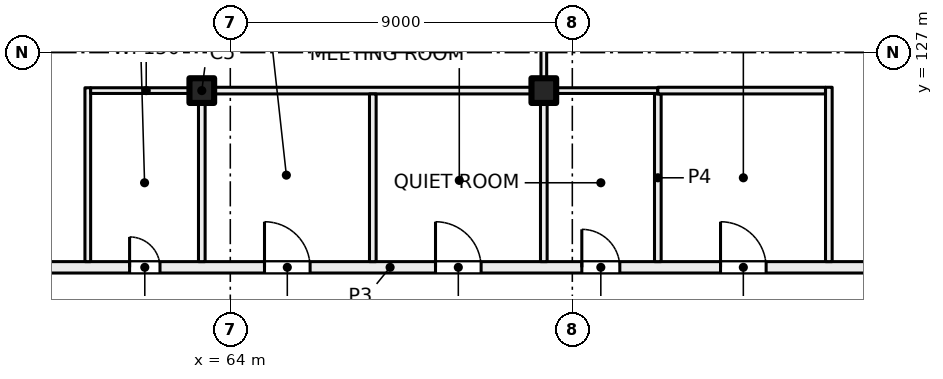
"""IFC4 building model, lengths in metres.
Left out: names, types, materials, properties, quantities, classifications, styles, units other than length and angle.
Written with IfcOpenShell. Run it as: python <this file> out.ifc"""

import sys

from ifc_helpers import new_model, si_unit, direction, frame, frame_2d, origin, origin_2d, place, context, subcontext, project, spatial, rectangle, extrude, element, fill, save


model = new_model("IFC4")
c1 = context("Model", 3, precision=1e-05, world=origin(), true_north=direction((0.0, 1.0)))
c2 = subcontext(c1, "Body", "Model", "MODEL_VIEW")
j1 = project(units=[si_unit("LENGTHUNIT", "METRE"), si_unit("PLANEANGLEUNIT", "RADIAN")], contexts=[c1])
p1 = place(None, origin())
s1 = spatial("IfcSite", under=j1, at=p1, CompositionType="ELEMENT")
p2 = place(p1, origin())
s2 = spatial("IfcBuilding", under=s1, at=p2, CompositionType="ELEMENT")
p3 = place(p2, frame((0.0, 0.0, 178.5)))
s3 = spatial("IfcBuildingStorey", under=s2, at=p3, CompositionType="ELEMENT", Elevation=178.5)
for number, where, z_axis, x_axis in (
    (1, (63.25, 126.0, 0.0), (0.0, 0.0, 1.0), (1.0, 0.0, 0.0)),
    (2, (72.25, 126.0, 0.0), (0.0, 0.0, 1.0), (1.0, 0.0, 0.0)),
):
    element("IfcColumn", number, at=place(p3, frame(where, z_axis=z_axis, x_axis=x_axis)), inside=s3, PredefinedType="COLUMN", context=c2, shape_type="SweptSolid", body=[
        extrude(rectangle(XDim=0.65, YDim=0.65, at=origin_2d()), origin(), (0.0, 0.0, 1.0), 4.0),
    ])
p4 = place(p3, frame((50.657, 121.35, 0.0), z_axis=(0.0, 0.0, 1.0), x_axis=(1.0, 0.0, 0.0)))
e3 = element("IfcWall", 3, at=p4, inside=s3, PredefinedType="PARTITIONING", context=c2, shape_type="SweptSolid", body=[
    extrude(rectangle(XDim=35.096, YDim=0.3, at=frame_2d((17.548, 0.0))), origin(), (0.0, 0.0, 1.0), 3.625),
])
p5 = place(p4, frame((26.243, 0.0, 0.0)))
e4 = element("IfcOpeningElement", 4, at=p5, cuts=e3, PredefinedType="OPENING", context=c2, shape_type="SweptSolid", body=[
    extrude(rectangle(XDim=1.2, YDim=2.1, at=frame_2d((0.6, 1.05))), frame((0.0, 0.16, 0.0), z_axis=(0.0, -1.0, 0.0), x_axis=(1.0, 0.0, 0.0)), (0.0, 0.0, 1.0), 0.32),
])
p6 = place(p4, frame((22.593, 0.0, 0.0)))
e5 = element("IfcOpeningElement", 5, at=p6, cuts=e3, PredefinedType="OPENING", context=c2, shape_type="SweptSolid", body=[
    extrude(rectangle(XDim=1.0, YDim=2.1, at=frame_2d((0.5, 1.05))), frame((0.0, 0.16, 0.0), z_axis=(0.0, -1.0, 0.0), x_axis=(1.0, 0.0, 0.0)), (0.0, 0.0, 1.0), 0.32),
])
p7 = place(p4, frame((31.193, 0.0, 0.0)))
e6 = element("IfcOpeningElement", 6, at=p7, cuts=e3, PredefinedType="OPENING", context=c2, shape_type="SweptSolid", body=[
    extrude(rectangle(XDim=1.8, YDim=2.1, at=frame_2d((0.9, 1.05))), frame((0.0, 0.16, 0.0), z_axis=(0.0, -1.0, 0.0), x_axis=(1.0, 0.0, 0.0)), (0.0, 0.0, 1.0), 0.32),
])
p8 = place(p4, frame((18.743, 0.0, 0.0)))
e7 = element("IfcOpeningElement", 7, at=p8, cuts=e3, PredefinedType="OPENING", context=c2, shape_type="SweptSolid", body=[
    extrude(rectangle(XDim=1.2, YDim=2.1, at=frame_2d((0.6, 1.05))), frame((0.0, 0.16, 0.0), z_axis=(0.0, -1.0, 0.0), x_axis=(1.0, 0.0, 0.0)), (0.0, 0.0, 1.0), 0.32),
])
p9 = place(p4, frame((14.243, 0.0, 0.0)))
e8 = element("IfcOpeningElement", 8, at=p9, cuts=e3, PredefinedType="OPENING", context=c2, shape_type="SweptSolid", body=[
    extrude(rectangle(XDim=1.2, YDim=2.1, at=frame_2d((0.6, 1.05))), frame((0.0, 0.16, 0.0), z_axis=(0.0, -1.0, 0.0), x_axis=(1.0, 0.0, 0.0)), (0.0, 0.0, 1.0), 0.32),
])
p10 = place(p4, frame((10.693, 0.0, 0.0)))
e9 = element("IfcOpeningElement", 9, at=p10, cuts=e3, PredefinedType="OPENING", context=c2, shape_type="SweptSolid", body=[
    extrude(rectangle(XDim=0.8, YDim=2.1, at=frame_2d((0.4, 1.05))), frame((0.0, 0.16, 0.0), z_axis=(0.0, -1.0, 0.0), x_axis=(1.0, 0.0, 0.0)), (0.0, 0.0, 1.0), 0.32),
])
p11 = place(p4, frame((5.693, 0.0, 0.0)))
e10 = element("IfcOpeningElement", 10, at=p11, cuts=e3, PredefinedType="OPENING", context=c2, shape_type="SweptSolid", body=[
    extrude(rectangle(XDim=1.8, YDim=2.1, at=frame_2d((0.9, 1.05))), frame((0.0, 0.16, 0.0), z_axis=(0.0, -1.0, 0.0), x_axis=(1.0, 0.0, 0.0)), (0.0, 0.0, 1.0), 0.32),
])
p12 = place(p4, frame((0.896, 0.0, 0.0)))
e11 = element("IfcOpeningElement", 11, at=p12, cuts=e3, PredefinedType="OPENING", context=c2, shape_type="SweptSolid", body=[
    extrude(rectangle(XDim=1.8, YDim=2.1, at=frame_2d((0.9, 1.05))), frame((0.0, 0.16, 0.0), z_axis=(0.0, -1.0, 0.0), x_axis=(1.0, 0.0, 0.0)), (0.0, 0.0, 1.0), 0.32),
])
p13 = place(p3, frame((60.25, 126.075, 0.0), z_axis=(0.0, 0.0, 1.0), x_axis=(0.0, -1.0, 0.0)))
e12 = element("IfcWall", 12, at=p13, inside=s3, PredefinedType="PARTITIONING", context=c2, shape_type="SweptSolid", body=[
    extrude(rectangle(XDim=4.575, YDim=0.15, at=frame_2d((2.288, 0.0))), origin(), (0.0, 0.0, 1.0), 3.625),
])
p14 = place(p3, frame((63.25, 121.5, 0.0), z_axis=(0.0, 0.0, 1.0), x_axis=(0.0, 1.0, 0.0)))
e13 = element("IfcWall", 13, at=p14, inside=s3, PredefinedType="PARTITIONING", context=c2, shape_type="SweptSolid", body=[
    extrude(rectangle(XDim=4.412, YDim=0.175, at=frame_2d((2.206, 0.0))), origin(), (0.0, 0.0, 1.0), 3.625),
])
p15 = place(p3, frame((63.25, 126.0, 0.0), z_axis=(0.0, 0.0, 1.0), x_axis=(-1.0, 0.0, 0.0)))
e14 = element("IfcWall", 14, at=p15, inside=s3, PredefinedType="PARTITIONING", context=c2, shape_type="SweptSolid", body=[
    extrude(rectangle(XDim=2.925, YDim=0.15, at=frame_2d((1.462, 0.0))), origin(), (0.0, 0.0, 1.0), 3.625),
])
p16 = place(p3, frame((63.25, 126.0, 0.0), z_axis=(0.0, 0.0, 1.0), x_axis=(1.0, 0.0, 0.0)))
e15 = element("IfcWall", 15, at=p16, inside=s3, PredefinedType="PARTITIONING", context=c2, shape_type="SweptSolid", body=[
    extrude(rectangle(XDim=9.0, YDim=0.175, at=frame_2d((4.5, 0.0))), origin(), (0.0, 0.0, 1.0), 3.625),
])
p17 = place(p3, frame((67.75, 121.5, 0.0), z_axis=(0.0, 0.0, 1.0), x_axis=(0.0, 1.0, 0.0)))
e16 = element("IfcWall", 16, at=p17, inside=s3, PredefinedType="PARTITIONING", context=c2, shape_type="SweptSolid", body=[
    extrude(rectangle(XDim=4.412, YDim=0.175, at=frame_2d((2.206, 0.0))), origin(), (0.0, 0.0, 1.0), 3.625),
])
p18 = place(p3, frame((72.25, 121.5, 0.0), z_axis=(0.0, 0.0, 1.0), x_axis=(0.0, 1.0, 0.0)))
e17 = element("IfcWall", 17, at=p18, inside=s3, PredefinedType="PARTITIONING", context=c2, shape_type="SweptSolid", body=[
    extrude(rectangle(XDim=4.5, YDim=0.175, at=frame_2d((2.25, 0.0))), origin(), (0.0, 0.0, 1.0), 3.625),
])
p19 = place(p3, frame((72.25, 126.0, 0.0), z_axis=(0.0, 0.0, 1.0), x_axis=(0.0, 1.0, 0.0)))
e18 = element("IfcWall", 18, at=p19, inside=s3, PredefinedType="PARTITIONING", context=c2, shape_type="SweptSolid", body=[
    extrude(rectangle(XDim=3.9, YDim=0.15, at=frame_2d((1.95, 0.0))), origin(), (0.0, 0.0, 1.0), 3.625),
])
p20 = place(p3, frame((75.25, 126.0, 0.0), z_axis=(0.0, 0.0, 1.0), x_axis=(-1.0, 0.0, 0.0)))
e19 = element("IfcWall", 19, at=p20, inside=s3, PredefinedType="PARTITIONING", context=c2, shape_type="SweptSolid", body=[
    extrude(rectangle(XDim=3.0, YDim=0.15, at=frame_2d((1.5, 0.0))), origin(), (0.0, 0.0, 1.0), 3.625),
])
p21 = place(p3, frame((75.25, 125.912, 0.0), z_axis=(0.0, 0.0, 1.0), x_axis=(0.0, -1.0, 0.0)))
e20 = element("IfcWall", 20, at=p21, inside=s3, PredefinedType="PARTITIONING", context=c2, shape_type="SweptSolid", body=[
    extrude(rectangle(XDim=4.412, YDim=0.175, at=frame_2d((2.206, 0.0))), origin(), (0.0, 0.0, 1.0), 3.625),
])
p22 = place(p3, frame((79.75, 121.5, 0.0), z_axis=(0.0, 0.0, 1.0), x_axis=(0.0, 1.0, 0.0)))
e21 = element("IfcWall", 21, at=p22, inside=s3, PredefinedType="PARTITIONING", context=c2, shape_type="SweptSolid", body=[
    extrude(rectangle(XDim=4.588, YDim=0.175, at=frame_2d((2.294, 0.0))), origin(), (0.0, 0.0, 1.0), 3.625),
])
p23 = place(p3, frame((79.662, 126.0, 0.0), z_axis=(0.0, 0.0, 1.0), x_axis=(-1.0, 0.0, 0.0)))
e22 = element("IfcWall", 22, at=p23, inside=s3, PredefinedType="PARTITIONING", context=c2, shape_type="SweptSolid", body=[
    extrude(rectangle(XDim=4.412, YDim=0.175, at=frame_2d((2.206, 0.0))), origin(), (0.0, 0.0, 1.0), 3.625),
])
p24 = place(p5, origin())
e23 = element("IfcDoor", 23, at=p24, inside=s3, OperationType="DOUBLE_DOOR_SINGLE_SWING", PredefinedType="DOOR", context=c2, shape_type="SweptSolid", body=[
    extrude(rectangle(XDim=1.2, YDim=2.1, at=frame_2d((0.6, 1.05))), frame((0.0, 0.025, 0.0), z_axis=(0.0, -1.0, 0.0), x_axis=(1.0, 0.0, 0.0)), (0.0, 0.0, 1.0), 0.05),
])
fill(e4, e23)
p25 = place(p6, origin())
e24 = element("IfcDoor", 24, at=p25, inside=s3, OperationType="SINGLE_SWING_LEFT", PredefinedType="DOOR", context=c2, shape_type="SweptSolid", body=[
    extrude(rectangle(XDim=1.0, YDim=2.1, at=frame_2d((0.5, 1.05))), frame((0.0, 0.025, 0.0), z_axis=(0.0, -1.0, 0.0), x_axis=(1.0, 0.0, 0.0)), (0.0, 0.0, 1.0), 0.05),
])
fill(e5, e24)
p26 = place(p8, origin())
e25 = element("IfcDoor", 25, at=p26, inside=s3, OperationType="DOUBLE_DOOR_SINGLE_SWING", PredefinedType="DOOR", context=c2, shape_type="SweptSolid", body=[
    extrude(rectangle(XDim=1.2, YDim=2.1, at=frame_2d((0.6, 1.05))), frame((0.0, 0.025, 0.0), z_axis=(0.0, -1.0, 0.0), x_axis=(1.0, 0.0, 0.0)), (0.0, 0.0, 1.0), 0.05),
])
fill(e7, e25)
p27 = place(p9, origin())
e26 = element("IfcDoor", 26, at=p27, inside=s3, OperationType="DOUBLE_DOOR_SINGLE_SWING", PredefinedType="DOOR", context=c2, shape_type="SweptSolid", body=[
    extrude(rectangle(XDim=1.2, YDim=2.1, at=frame_2d((0.6, 1.05))), frame((0.0, 0.025, 0.0), z_axis=(0.0, -1.0, 0.0), x_axis=(1.0, 0.0, 0.0)), (0.0, 0.0, 1.0), 0.05),
])
fill(e8, e26)
p28 = place(p10, origin())
e27 = element("IfcDoor", 27, at=p28, inside=s3, OperationType="SINGLE_SWING_LEFT", PredefinedType="DOOR", context=c2, shape_type="SweptSolid", body=[
    extrude(rectangle(XDim=0.8, YDim=2.1, at=frame_2d((0.4, 1.05))), frame((0.0, 0.025, 0.0), z_axis=(0.0, -1.0, 0.0), x_axis=(1.0, 0.0, 0.0)), (0.0, 0.0, 1.0), 0.05),
])
fill(e9, e27)
save(model, sys.argv[1])
